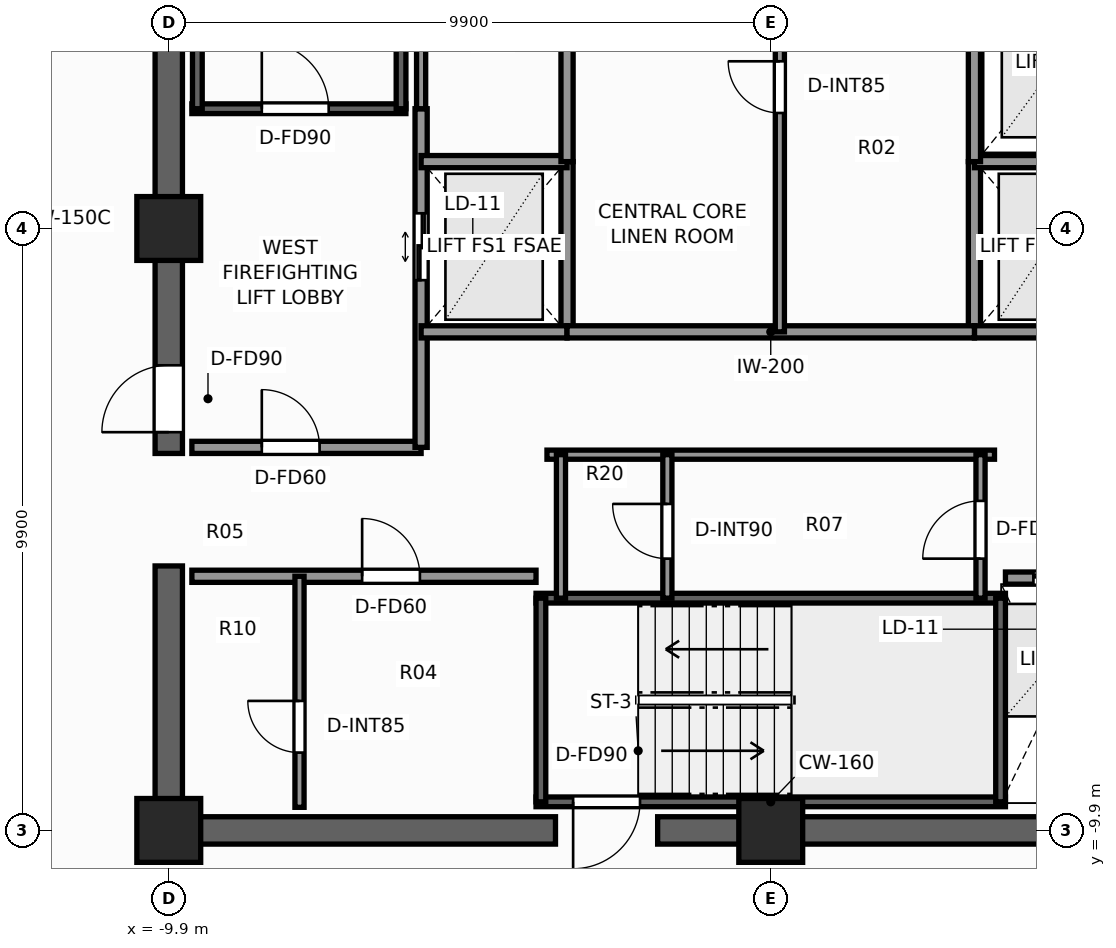
"""IFC4 building model, lengths in metres.
Left out: names, types, materials, properties, quantities, classifications, styles, units other than length and angle.
Written with IfcOpenShell. Run it as: python <this file> out.ifc"""

import sys

from ifc_helpers import new_model, si_unit, direction, frame, frame_2d, origin, origin_2d, place, context, subcontext, project, spatial, rectangle, extrude, element, fill, save


model = new_model("IFC4")
c1 = context("Model", 3, precision=1e-05, world=origin(), true_north=direction((0.0, 1.0)))
c2 = subcontext(c1, "Body", "Model", "MODEL_VIEW")
j1 = project(units=[si_unit("LENGTHUNIT", "METRE"), si_unit("PLANEANGLEUNIT", "RADIAN")], contexts=[c1])
p1 = place(None, origin())
s1 = spatial("IfcSite", under=j1, at=p1, CompositionType="ELEMENT")
p2 = place(p1, origin())
s2 = spatial("IfcBuilding", under=s1, at=p2, CompositionType="ELEMENT")
p3 = place(p2, frame((0.0, 0.0, 226.2)))
s3 = spatial("IfcBuildingStorey", under=s2, at=p3, CompositionType="ELEMENT", Elevation=226.2)
p4 = place(p3, frame((10.125, -9.9, 0.0), z_axis=(0.0, 0.0, 1.0), x_axis=(-1.0, 0.0, 0.0)))
e1 = element("IfcWall", 1, at=p4, inside=s3, PredefinedType="SHEAR", context=c2, shape_type="SweptSolid", body=[
    extrude(rectangle(XDim=11.985, YDim=0.45, at=frame_2d((5.993, 0.0))), origin(), (0.0, 0.0, 1.0), 3.3),
])
p5 = place(p3, frame((-3.54, -9.9, 0.0), z_axis=(0.0, 0.0, 1.0), x_axis=(-1.0, 0.0, 0.0)))
e2 = element("IfcWall", 2, at=p5, inside=s3, PredefinedType="SHEAR", context=c2, shape_type="SweptSolid", body=[
    extrude(rectangle(XDim=6.585, YDim=0.45, at=frame_2d((3.292, 0.0))), origin(), (0.0, 0.0, 1.0), 3.3),
])
p6 = place(p3, frame((-9.9, -9.675, 0.0), z_axis=(0.0, 0.0, 1.0), x_axis=(0.0, 1.0, 0.0)))
e3 = element("IfcWall", 3, at=p6, inside=s3, PredefinedType="SHEAR", context=c2, shape_type="SweptSolid", body=[
    extrude(rectangle(XDim=4.125, YDim=0.45, at=frame_2d((2.062, 0.0))), origin(), (0.0, 0.0, 1.0), 3.3),
])
p7 = place(p3, frame((-9.9, -3.7, 0.0), z_axis=(0.0, 0.0, 1.0), x_axis=(0.0, 1.0, 0.0)))
e4 = element("IfcWall", 4, at=p7, inside=s3, PredefinedType="SHEAR", context=c2, shape_type="SweptSolid", body=[
    extrude(rectangle(XDim=13.375, YDim=0.45, at=frame_2d((6.688, 0.0))), origin(), (0.0, 0.0, 1.0), 3.3),
])
p8 = place(p7, frame((0.35, 0.0, 0.0)))
e5 = element("IfcOpeningElement", 5, at=p8, cuts=e4, PredefinedType="OPENING", context=c2, shape_type="SweptSolid", body=[
    extrude(rectangle(XDim=1.1, YDim=2.2, at=frame_2d((0.55, 1.1))), frame((0.0, 0.235, 0.0), z_axis=(0.0, -1.0, 0.0), x_axis=(1.0, 0.0, 0.0)), (0.0, 0.0, 1.0), 0.47),
])
for number, where, z_axis, x_axis in (
    (6, (-9.9, -9.9, 0.0), (0.0, 0.0, 1.0), (1.0, 0.0, 0.0)),
    (7, (0.0, -9.9, 0.0), (0.0, 0.0, 1.0), (1.0, 0.0, 0.0)),
    (8, (-9.9, 0.0, 0.0), (0.0, 0.0, 1.0), (1.0, 0.0, 0.0)),
):
    element("IfcColumn", number, at=place(p3, frame(where, z_axis=z_axis, x_axis=x_axis)), inside=s3, PredefinedType="COLUMN", context=c2, shape_type="SweptSolid", body=[
        extrude(rectangle(XDim=1.05, YDim=1.05, at=origin_2d()), origin(), (0.0, 0.0, 1.0), 3.3),
    ])
p9 = place(p3, frame((-9.52, 1.97, 0.0), z_axis=(0.0, 0.0, 1.0), x_axis=(1.0, 0.0, 0.0)))
e9 = element("IfcWall", 9, at=p9, inside=s3, PredefinedType="SHEAR", context=c2, shape_type="SweptSolid", body=[
    extrude(rectangle(XDim=3.52, YDim=0.16, at=frame_2d((1.76, 0.0))), origin(), (0.0, 0.0, 1.0), 3.3),
])
p10 = place(p9, frame((1.15, 0.0, 0.0)))
e10 = element("IfcOpeningElement", 10, at=p10, cuts=e9, PredefinedType="OPENING", context=c2, shape_type="SweptSolid", body=[
    extrude(rectangle(XDim=1.1, YDim=2.2, at=frame_2d((0.55, 1.1))), frame((0.0, 0.09, 0.0), z_axis=(0.0, -1.0, 0.0), x_axis=(1.0, 0.0, 0.0)), (0.0, 0.0, 1.0), 0.18),
])
for number, where, z_axis, x_axis in (
    (11, (-9.43, 1.97, 0.0), (0.0, 0.0, 1.0), (0.0, 1.0, 0.0)),
    (12, (-6.08, 1.97, 0.0), (0.0, 0.0, 1.0), (0.0, 1.0, 0.0)),
):
    element("IfcWall", number, at=place(p3, frame(where, z_axis=z_axis, x_axis=x_axis)), inside=s3, PredefinedType="SHEAR", context=c2, shape_type="SweptSolid", body=[
        extrude(rectangle(XDim=7.56, YDim=0.16, at=frame_2d((3.78, 0.0))), origin(), (0.0, 0.0, 1.0), 3.3),
    ])
p11 = place(p3, frame((3.86, -9.43, 0.0), z_axis=(0.0, 0.0, 1.0), x_axis=(-1.0, 0.0, 0.0)))
e13 = element("IfcWall", 13, at=p11, inside=s3, PredefinedType="SHEAR", context=c2, shape_type="SweptSolid", body=[
    extrude(rectangle(XDim=7.72, YDim=0.16, at=frame_2d((3.86, 0.0))), origin(), (0.0, 0.0, 1.0), 3.3),
])
p12 = place(p11, frame((6.01, 0.0, 0.0)))
e14 = element("IfcOpeningElement", 14, at=p12, cuts=e13, PredefinedType="OPENING", context=c2, shape_type="SweptSolid", body=[
    extrude(rectangle(XDim=1.1, YDim=2.2, at=frame_2d((0.55, 1.1))), frame((0.0, 0.09, 0.0), z_axis=(0.0, -1.0, 0.0), x_axis=(1.0, 0.0, 0.0)), (0.0, 0.0, 1.0), 0.18),
])
p13 = place(p3, frame((-3.86, -6.08, 0.0), z_axis=(0.0, 0.0, 1.0), x_axis=(1.0, 0.0, 0.0)))
e15 = element("IfcWall", 15, at=p13, inside=s3, PredefinedType="SHEAR", context=c2, shape_type="SweptSolid", body=[
    extrude(rectangle(XDim=7.72, YDim=0.16, at=frame_2d((3.86, 0.0))), origin(), (0.0, 0.0, 1.0), 3.3),
])
for number, where, z_axis, x_axis in (
    (16, (-3.78, -9.43, 0.0), (0.0, 0.0, 1.0), (0.0, 1.0, 0.0)),
    (17, (3.78, -9.43, 0.0), (0.0, 0.0, 1.0), (0.0, 1.0, 0.0)),
):
    element("IfcWall", number, at=place(p3, frame(where, z_axis=z_axis, x_axis=x_axis)), inside=s3, PredefinedType="SHEAR", context=c2, shape_type="SweptSolid", body=[
        extrude(rectangle(XDim=3.35, YDim=0.16, at=frame_2d((1.675, 0.0))), origin(), (0.0, 0.0, 1.0), 3.3),
    ])
p14 = place(p3, frame((-9.52, -3.6, 0.0), z_axis=(0.0, 0.0, 1.0), x_axis=(1.0, 0.0, 0.0)))
e18 = element("IfcWall", 18, at=p14, inside=s3, PredefinedType="SOLIDWALL", context=c2, shape_type="SweptSolid", body=[
    extrude(rectangle(XDim=3.77, YDim=0.2, at=frame_2d((1.885, 0.0))), origin(), (0.0, 0.0, 1.0), 3.08),
])
p15 = place(p14, frame((1.15, 0.0, 0.0)))
e19 = element("IfcOpeningElement", 19, at=p15, cuts=e18, PredefinedType="OPENING", context=c2, shape_type="SweptSolid", body=[
    extrude(rectangle(XDim=0.95, YDim=2.06, at=frame_2d((0.475, 1.03))), frame((0.0, 0.11, 0.0), z_axis=(0.0, -1.0, 0.0), x_axis=(1.0, 0.0, 0.0)), (0.0, 0.0, 1.0), 0.22),
])
p16 = place(p3, frame((-5.75, -3.6, 0.0), z_axis=(0.0, 0.0, 1.0), x_axis=(0.0, 1.0, 0.0)))
e20 = element("IfcWall", 20, at=p16, inside=s3, PredefinedType="SOLIDWALL", context=c2, shape_type="SweptSolid", body=[
    extrude(rectangle(XDim=5.57, YDim=0.2, at=frame_2d((2.785, 0.0))), origin(), (0.0, 0.0, 1.0), 3.08),
])
p17 = place(p16, frame((2.75, 0.0, 0.0)))
e21 = element("IfcOpeningElement", 21, at=p17, cuts=e20, PredefinedType="OPENING", context=c2, shape_type="SweptSolid", body=[
    extrude(rectangle(XDim=1.1, YDim=2.2, at=frame_2d((0.55, 1.1))), frame((0.0, 0.11, 0.0), z_axis=(0.0, -1.0, 0.0), x_axis=(1.0, 0.0, 0.0)), (0.0, 0.0, 1.0), 0.22),
])
p18 = place(p3, frame((-3.35, -1.7, 0.0), z_axis=(0.0, 0.0, 1.0), x_axis=(0.0, 1.0, 0.0)))
e22 = element("IfcWall", 22, at=p18, inside=s3, PredefinedType="SOLIDWALL", context=c2, shape_type="SweptSolid", body=[
    extrude(rectangle(XDim=2.8, YDim=0.2, at=frame_2d((1.4, 0.0))), origin(), (0.0, 0.0, 1.0), 3.08),
])
for number, where, z_axis, x_axis in (
    (23, (-5.75, -1.7, 0.0), (0.0, 0.0, 1.0), (1.0, 0.0, 0.0)),
    (24, (-5.75, 1.1, 0.0), (0.0, 0.0, 1.0), (1.0, 0.0, 0.0)),
):
    element("IfcWall", number, at=place(p3, frame(where, z_axis=z_axis, x_axis=x_axis)), inside=s3, PredefinedType="SOLIDWALL", context=c2, shape_type="SweptSolid", body=[
        extrude(rectangle(XDim=2.4, YDim=0.2, at=frame_2d((1.2, 0.0))), origin(), (0.0, 0.0, 1.0), 3.08),
    ])
p19 = place(p3, frame((3.35, -1.7, 0.0), z_axis=(0.0, 0.0, 1.0), x_axis=(0.0, 1.0, 0.0)))
e25 = element("IfcWall", 25, at=p19, inside=s3, PredefinedType="SOLIDWALL", context=c2, shape_type="SweptSolid", body=[
    extrude(rectangle(XDim=2.8, YDim=0.2, at=frame_2d((1.4, 0.0))), origin(), (0.0, 0.0, 1.0), 3.08),
])
for number, where, z_axis, x_axis in (
    (26, (3.35, -1.7, 0.0), (0.0, 0.0, 1.0), (1.0, 0.0, 0.0)),
    (27, (3.35, 1.1, 0.0), (0.0, 0.0, 1.0), (1.0, 0.0, 0.0)),
):
    element("IfcWall", number, at=place(p3, frame(where, z_axis=z_axis, x_axis=x_axis)), inside=s3, PredefinedType="SOLIDWALL", context=c2, shape_type="SweptSolid", body=[
        extrude(rectangle(XDim=2.4, YDim=0.2, at=frame_2d((1.2, 0.0))), origin(), (0.0, 0.0, 1.0), 3.08),
    ])
p20 = place(p3, frame((-9.52, -5.72, 0.0), z_axis=(0.0, 0.0, 1.0), x_axis=(1.0, 0.0, 0.0)))
e28 = element("IfcWall", 28, at=p20, inside=s3, PredefinedType="SOLIDWALL", context=c2, shape_type="SweptSolid", body=[
    extrude(rectangle(XDim=5.66, YDim=0.2, at=frame_2d((2.83, 0.0))), origin(), (0.0, 0.0, 1.0), 3.08),
])
p21 = place(p20, frame((2.8, 0.0, 0.0)))
e29 = element("IfcOpeningElement", 29, at=p21, cuts=e28, PredefinedType="OPENING", context=c2, shape_type="SweptSolid", body=[
    extrude(rectangle(XDim=0.95, YDim=2.06, at=frame_2d((0.475, 1.03))), frame((0.0, 0.11, 0.0), z_axis=(0.0, -1.0, 0.0), x_axis=(1.0, 0.0, 0.0)), (0.0, 0.0, 1.0), 0.22),
])
p22 = place(p3, frame((-7.75, -9.52, 0.0), z_axis=(0.0, 0.0, 1.0), x_axis=(0.0, 1.0, 0.0)))
e30 = element("IfcWall", 30, at=p22, inside=s3, PredefinedType="PARTITIONING", context=c2, shape_type="SweptSolid", body=[
    extrude(rectangle(XDim=3.8, YDim=0.15, at=frame_2d((1.9, 0.0))), origin(), (0.0, 0.0, 1.0), 3.08),
])
p23 = place(p22, frame((0.9, 0.0, 0.0)))
e31 = element("IfcOpeningElement", 31, at=p23, cuts=e30, PredefinedType="OPENING", context=c2, shape_type="SweptSolid", body=[
    extrude(rectangle(XDim=0.85, YDim=2.03, at=frame_2d((0.425, 1.015))), frame((0.0, 0.085, 0.0), z_axis=(0.0, -1.0, 0.0), x_axis=(1.0, 0.0, 0.0)), (0.0, 0.0, 1.0), 0.17),
])
p24 = place(p3, frame((3.86, -5.75, 0.0), z_axis=(0.0, 0.0, 1.0), x_axis=(1.0, 0.0, 0.0)))
e32 = element("IfcWall", 32, at=p24, inside=s3, PredefinedType="SOLIDWALL", context=c2, shape_type="SweptSolid", body=[
    extrude(rectangle(XDim=5.66, YDim=0.2, at=frame_2d((2.83, 0.0))), origin(), (0.0, 0.0, 1.0), 3.08),
])
p25 = place(p24, frame((0.46, 0.0, 0.0)))
e33 = element("IfcOpeningElement", 33, at=p25, cuts=e32, PredefinedType="OPENING", context=c2, shape_type="SweptSolid", body=[
    extrude(rectangle(XDim=1.1, YDim=2.2, at=frame_2d((0.55, 1.1))), frame((0.0, 0.11, 0.0), z_axis=(0.0, -1.0, 0.0), x_axis=(1.0, 0.0, 0.0)), (0.0, 0.0, 1.0), 0.22),
])
p26 = place(p24, frame((2.39, 0.0, 0.0)))
e34 = element("IfcOpeningElement", 34, at=p26, cuts=e32, PredefinedType="OPENING", context=c2, shape_type="SweptSolid", body=[
    extrude(rectangle(XDim=1.1, YDim=2.2, at=frame_2d((0.55, 1.1))), frame((0.0, 0.11, 0.0), z_axis=(0.0, -1.0, 0.0), x_axis=(1.0, 0.0, 0.0)), (0.0, 0.0, 1.0), 0.22),
])
p27 = place(p24, frame((4.32, 0.0, 0.0)))
e35 = element("IfcOpeningElement", 35, at=p27, cuts=e32, PredefinedType="OPENING", context=c2, shape_type="SweptSolid", body=[
    extrude(rectangle(XDim=1.1, YDim=2.2, at=frame_2d((0.55, 1.1))), frame((0.0, 0.11, 0.0), z_axis=(0.0, -1.0, 0.0), x_axis=(1.0, 0.0, 0.0)), (0.0, 0.0, 1.0), 0.22),
])
p28 = place(p3, frame((-3.35, -1.7, 0.0), z_axis=(0.0, 0.0, 1.0), x_axis=(1.0, 0.0, 0.0)))
e36 = element("IfcWall", 36, at=p28, inside=s3, PredefinedType="SOLIDWALL", context=c2, shape_type="SweptSolid", body=[
    extrude(rectangle(XDim=6.7, YDim=0.2, at=frame_2d((3.35, 0.0))), origin(), (0.0, 0.0, 1.0), 3.08),
])
for number, where, z_axis, x_axis in (
    (37, (-3.35, 1.1, 0.0), (0.0, 0.0, 1.0), (0.0, 1.0, 0.0)),
    (38, (3.35, 1.1, 0.0), (0.0, 0.0, 1.0), (0.0, 1.0, 0.0)),
):
    element("IfcWall", number, at=place(p3, frame(where, z_axis=z_axis, x_axis=x_axis)), inside=s3, PredefinedType="SOLIDWALL", context=c2, shape_type="SweptSolid", body=[
        extrude(rectangle(XDim=3.2, YDim=0.2, at=frame_2d((1.6, 0.0))), origin(), (0.0, 0.0, 1.0), 3.08),
    ])
p29 = place(p3, frame((0.15, -1.7, 0.0), z_axis=(0.0, 0.0, 1.0), x_axis=(0.0, 1.0, 0.0)))
e39 = element("IfcWall", 39, at=p29, inside=s3, PredefinedType="PARTITIONING", context=c2, shape_type="SweptSolid", body=[
    extrude(rectangle(XDim=6.0, YDim=0.15, at=frame_2d((3.0, 0.0))), origin(), (0.0, 0.0, 1.0), 3.08),
])
p30 = place(p29, frame((3.6, 0.0, 0.0)))
e40 = element("IfcOpeningElement", 40, at=p30, cuts=e39, PredefinedType="OPENING", context=c2, shape_type="SweptSolid", body=[
    extrude(rectangle(XDim=0.85, YDim=2.03, at=frame_2d((0.425, 1.015))), frame((0.0, 0.085, 0.0), z_axis=(0.0, -1.0, 0.0), x_axis=(1.0, 0.0, 0.0)), (0.0, 0.0, 1.0), 0.17),
])
p31 = place(p3, frame((-3.68, -3.72, 0.0), z_axis=(0.0, 0.0, 1.0), x_axis=(1.0, 0.0, 0.0)))
e41 = element("IfcWall", 41, at=p31, inside=s3, PredefinedType="PARTITIONING", context=c2, shape_type="SweptSolid", body=[
    extrude(rectangle(XDim=7.36, YDim=0.15, at=frame_2d((3.68, 0.0))), origin(), (0.0, 0.0, 1.0), 3.08),
])
p32 = place(p3, frame((3.45, -6.08, 0.0), z_axis=(0.0, 0.0, 1.0), x_axis=(0.0, 1.0, 0.0)))
e42 = element("IfcWall", 42, at=p32, inside=s3, PredefinedType="PARTITIONING", context=c2, shape_type="SweptSolid", body=[
    extrude(rectangle(XDim=2.36, YDim=0.15, at=frame_2d((1.18, 0.0))), origin(), (0.0, 0.0, 1.0), 3.08),
])
p33 = place(p32, frame((0.65, 0.0, 0.0)))
e43 = element("IfcOpeningElement", 43, at=p33, cuts=e42, PredefinedType="OPENING", context=c2, shape_type="SweptSolid", body=[
    extrude(rectangle(XDim=0.95, YDim=2.06, at=frame_2d((0.475, 1.03))), frame((0.0, 0.085, 0.0), z_axis=(0.0, -1.0, 0.0), x_axis=(1.0, 0.0, 0.0)), (0.0, 0.0, 1.0), 0.17),
])
p34 = place(p3, frame((-3.45, -6.08, 0.0), z_axis=(0.0, 0.0, 1.0), x_axis=(0.0, 1.0, 0.0)))
e44 = element("IfcWall", 44, at=p34, inside=s3, PredefinedType="PARTITIONING", context=c2, shape_type="SweptSolid", body=[
    extrude(rectangle(XDim=2.36, YDim=0.15, at=frame_2d((1.18, 0.0))), origin(), (0.0, 0.0, 1.0), 3.08),
])
p35 = place(p3, frame((-1.7, -6.08, 0.0), z_axis=(0.0, 0.0, 1.0), x_axis=(0.0, 1.0, 0.0)))
e45 = element("IfcWall", 45, at=p35, inside=s3, PredefinedType="PARTITIONING", context=c2, shape_type="SweptSolid", body=[
    extrude(rectangle(XDim=2.36, YDim=0.15, at=frame_2d((1.18, 0.0))), origin(), (0.0, 0.0, 1.0), 3.08),
])
p36 = place(p35, frame((0.65, 0.0, 0.0)))
e46 = element("IfcOpeningElement", 46, at=p36, cuts=e45, PredefinedType="OPENING", context=c2, shape_type="SweptSolid", body=[
    extrude(rectangle(XDim=0.9, YDim=2.06, at=frame_2d((0.45, 1.03))), frame((0.0, 0.085, 0.0), z_axis=(0.0, -1.0, 0.0), x_axis=(1.0, 0.0, 0.0)), (0.0, 0.0, 1.0), 0.17),
])
p37 = place(p3, frame((-5.75, 1.97, 0.0), z_axis=(0.0, 0.0, 1.0), x_axis=(0.0, 1.0, 0.0)))
e47 = element("IfcWall", 47, at=p37, inside=s3, PredefinedType="PARTITIONING", context=c2, shape_type="SweptSolid", body=[
    extrude(rectangle(XDim=2.33, YDim=0.15, at=frame_2d((1.165, 0.0))), origin(), (0.0, 0.0, 1.0), 3.08),
])
p38 = place(p10, origin())
e48 = element("IfcDoor", 48, at=p38, inside=s3, OperationType="SINGLE_SWING_LEFT", PredefinedType="DOOR", context=c2, shape_type="SweptSolid", body=[
    extrude(rectangle(XDim=1.1, YDim=2.2, at=frame_2d((0.55, 1.1))), frame((0.0, 0.025, 0.0), z_axis=(0.0, -1.0, 0.0), x_axis=(1.0, 0.0, 0.0)), (0.0, 0.0, 1.0), 0.05),
])
fill(e10, e48)
p39 = place(p12, origin())
e49 = element("IfcDoor", 49, at=p39, inside=s3, OperationType="SINGLE_SWING_RIGHT", PredefinedType="DOOR", context=c2, shape_type="SweptSolid", body=[
    extrude(rectangle(XDim=1.1, YDim=2.2, at=frame_2d((0.55, 1.1))), frame((0.0, 0.025, 0.0), z_axis=(0.0, -1.0, 0.0), x_axis=(1.0, 0.0, 0.0)), (0.0, 0.0, 1.0), 0.05),
])
fill(e14, e49)
p40 = place(p8, origin())
e50 = element("IfcDoor", 50, at=p40, inside=s3, OperationType="SINGLE_SWING_LEFT", PredefinedType="DOOR", context=c2, shape_type="SweptSolid", body=[
    extrude(rectangle(XDim=1.1, YDim=2.2, at=frame_2d((0.55, 1.1))), frame((0.0, 0.025, 0.0), z_axis=(0.0, -1.0, 0.0), x_axis=(1.0, 0.0, 0.0)), (0.0, 0.0, 1.0), 0.05),
])
fill(e5, e50)
p41 = place(p17, origin())
e51 = element("IfcDoor", 51, at=p41, inside=s3, OperationType="DOUBLE_DOOR_SLIDING", PredefinedType="DOOR", context=c2, shape_type="SweptSolid", body=[
    extrude(rectangle(XDim=1.1, YDim=2.2, at=frame_2d((0.55, 1.1))), frame((0.0, 0.025, 0.0), z_axis=(0.0, -1.0, 0.0), x_axis=(1.0, 0.0, 0.0)), (0.0, 0.0, 1.0), 0.05),
])
fill(e21, e51)
p42 = place(p21, origin())
e52 = element("IfcDoor", 52, at=p42, inside=s3, OperationType="SINGLE_SWING_LEFT", PredefinedType="DOOR", context=c2, shape_type="SweptSolid", body=[
    extrude(rectangle(XDim=0.95, YDim=2.06, at=frame_2d((0.475, 1.03))), frame((0.0, 0.025, 0.0), z_axis=(0.0, -1.0, 0.0), x_axis=(1.0, 0.0, 0.0)), (0.0, 0.0, 1.0), 0.05),
])
fill(e29, e52)
p43 = place(p23, origin())
e53 = element("IfcDoor", 53, at=p43, inside=s3, OperationType="SINGLE_SWING_RIGHT", PredefinedType="DOOR", context=c2, shape_type="SweptSolid", body=[
    extrude(rectangle(XDim=0.85, YDim=2.03, at=frame_2d((0.425, 1.015))), frame((0.0, 0.025, 0.0), z_axis=(0.0, -1.0, 0.0), x_axis=(1.0, 0.0, 0.0)), (0.0, 0.0, 1.0), 0.05),
])
fill(e31, e53)
p44 = place(p15, origin())
e54 = element("IfcDoor", 54, at=p44, inside=s3, OperationType="SINGLE_SWING_LEFT", PredefinedType="DOOR", context=c2, shape_type="SweptSolid", body=[
    extrude(rectangle(XDim=0.95, YDim=2.06, at=frame_2d((0.475, 1.03))), frame((0.0, 0.025, 0.0), z_axis=(0.0, -1.0, 0.0), x_axis=(1.0, 0.0, 0.0)), (0.0, 0.0, 1.0), 0.05),
])
fill(e19, e54)
p45 = place(p25, origin())
e55 = element("IfcDoor", 55, at=p45, inside=s3, OperationType="DOUBLE_DOOR_SLIDING", PredefinedType="DOOR", context=c2, shape_type="SweptSolid", body=[
    extrude(rectangle(XDim=1.1, YDim=2.2, at=frame_2d((0.55, 1.1))), frame((0.0, 0.025, 0.0), z_axis=(0.0, -1.0, 0.0), x_axis=(1.0, 0.0, 0.0)), (0.0, 0.0, 1.0), 0.05),
])
fill(e33, e55)
p46 = place(p30, origin())
e56 = element("IfcDoor", 56, at=p46, inside=s3, OperationType="SINGLE_SWING_RIGHT", PredefinedType="DOOR", context=c2, shape_type="SweptSolid", body=[
    extrude(rectangle(XDim=0.85, YDim=2.03, at=frame_2d((0.425, 1.015))), frame((0.0, 0.025, 0.0), z_axis=(0.0, -1.0, 0.0), x_axis=(1.0, 0.0, 0.0)), (0.0, 0.0, 1.0), 0.05),
])
fill(e40, e56)
p47 = place(p33, origin())
e57 = element("IfcDoor", 57, at=p47, inside=s3, OperationType="SINGLE_SWING_LEFT", PredefinedType="DOOR", context=c2, shape_type="SweptSolid", body=[
    extrude(rectangle(XDim=0.95, YDim=2.06, at=frame_2d((0.475, 1.03))), frame((0.0, 0.025, 0.0), z_axis=(0.0, -1.0, 0.0), x_axis=(1.0, 0.0, 0.0)), (0.0, 0.0, 1.0), 0.05),
])
fill(e43, e57)
p48 = place(p36, origin())
e58 = element("IfcDoor", 58, at=p48, inside=s3, OperationType="SINGLE_SWING_RIGHT", PredefinedType="DOOR", context=c2, shape_type="SweptSolid", body=[
    extrude(rectangle(XDim=0.9, YDim=2.06, at=frame_2d((0.45, 1.03))), frame((0.0, 0.025, 0.0), z_axis=(0.0, -1.0, 0.0), x_axis=(1.0, 0.0, 0.0)), (0.0, 0.0, 1.0), 0.05),
])
fill(e46, e58)
save(model, sys.argv[1])
